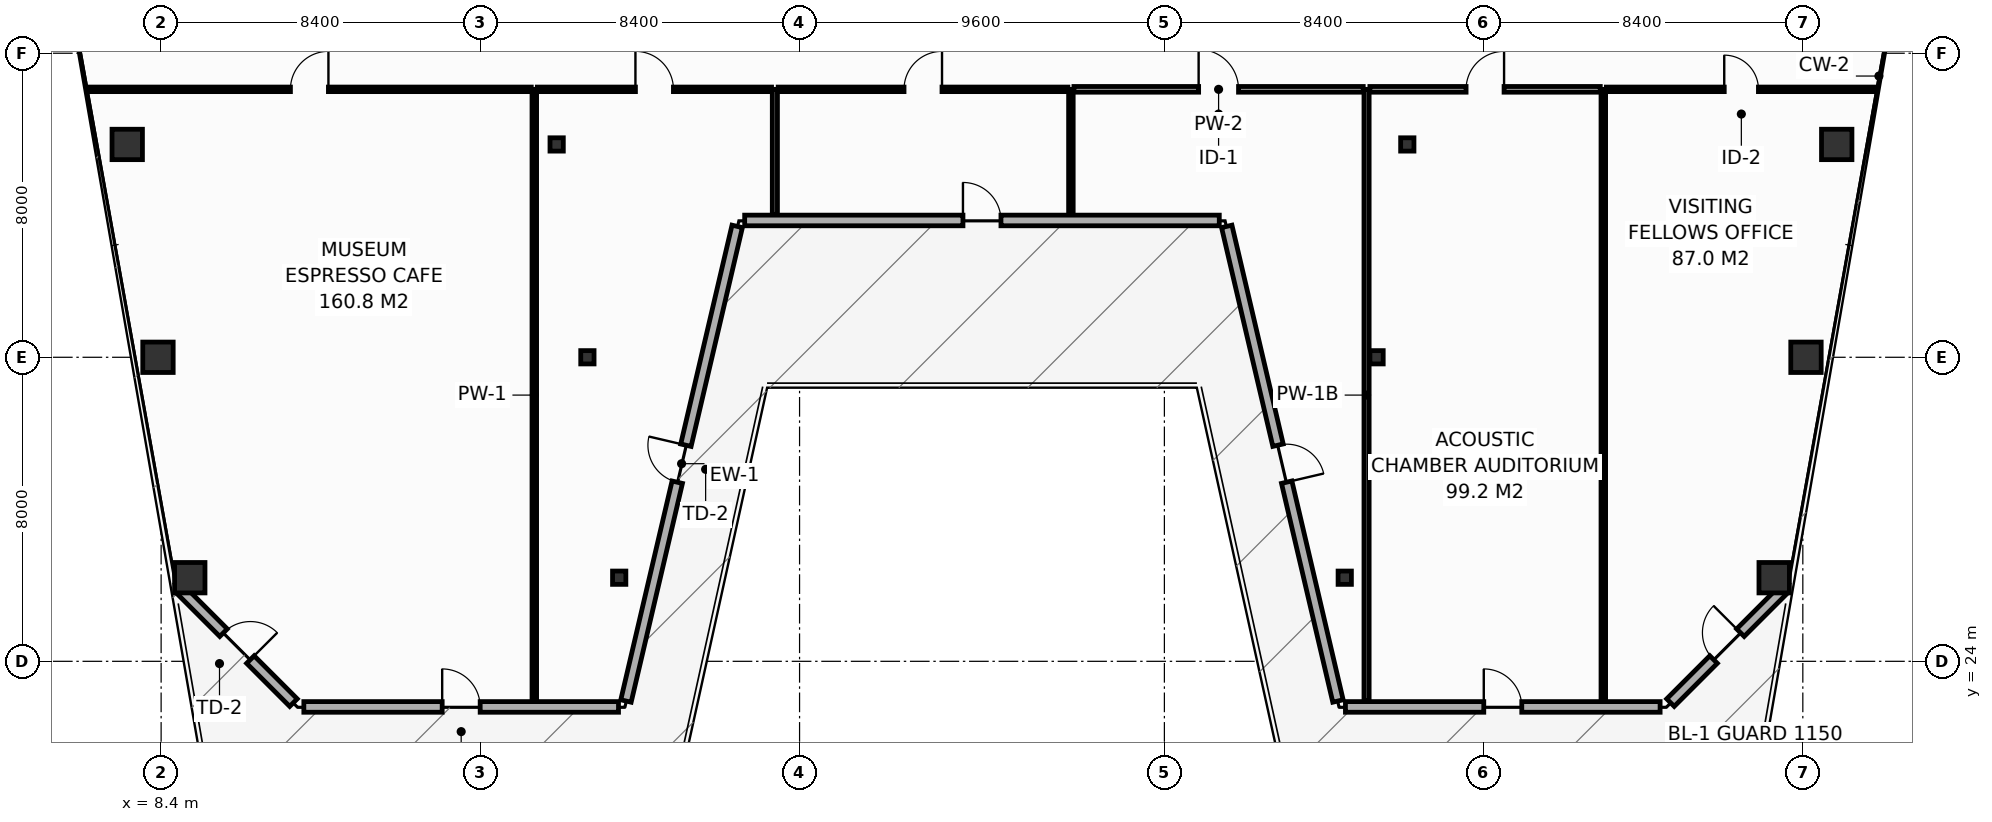
"""IFC4 building model, lengths in metres.
Left out: names, types, materials, properties, quantities, classifications, styles, units other than length and angle.
Written with IfcOpenShell. Run it as: python <this file> out.ifc"""

import sys

from ifc_helpers import new_model, si_unit, direction, frame, frame_2d, origin, origin_2d, place, context, subcontext, project, spatial, rectangle, hollow_rectangle, extrude, element, fill, save


model = new_model("IFC4")
c1 = context("Model", 3, precision=1e-05, world=origin(), true_north=direction((0.0, 1.0)))
c2 = subcontext(c1, "Body", "Model", "MODEL_VIEW")
j1 = project(units=[si_unit("LENGTHUNIT", "METRE"), si_unit("PLANEANGLEUNIT", "RADIAN")], contexts=[c1])
p1 = place(None, origin())
s1 = spatial("IfcSite", under=j1, at=p1, CompositionType="ELEMENT")
p2 = place(p1, origin())
s2 = spatial("IfcBuilding", under=s1, at=p2, CompositionType="ELEMENT")
p3 = place(p2, frame((0.0, 0.0, 253.4)))
s3 = spatial("IfcBuildingStorey", under=s2, at=p3, CompositionType="ELEMENT", Elevation=253.4)
for number, where, z_axis, x_axis in (
    (1, (9.154, 26.2, 0.0), (0.0, 0.0, 1.0), (1.0, 0.0, 0.0)),
    (2, (50.846, 26.2, 0.0), (0.0, 0.0, 1.0), (1.0, 0.0, 0.0)),
):
    element("IfcColumn", number, at=place(p3, frame(where, z_axis=z_axis, x_axis=x_axis)), inside=s3, PredefinedType="COLUMN", context=c2, shape_type="SweptSolid", body=[
        extrude(hollow_rectangle(XDim=0.8, YDim=0.8, WallThickness=0.036, at=origin_2d()), origin(), (0.0, 0.0, 1.0), 3.8),
    ])
for number, where, z_axis, x_axis in (
    (3, (20.454, 26.2, 0.0), (0.0, 0.0, 1.0), (1.0, 0.0, 0.0)),
    (4, (39.546, 26.2, 0.0), (0.0, 0.0, 1.0), (1.0, 0.0, 0.0)),
):
    element("IfcColumn", number, at=place(p3, frame(where, z_axis=z_axis, x_axis=x_axis)), inside=s3, PredefinedType="COLUMN", context=c2, shape_type="SweptSolid", body=[
        extrude(hollow_rectangle(XDim=0.35, YDim=0.35, WallThickness=0.016, at=origin_2d()), origin(), (0.0, 0.0, 1.0), 3.8),
    ])
for number, where, z_axis, x_axis in (
    (5, (8.317, 32.0, 0.0), (0.0, 0.0, 1.0), (1.0, 0.0, 0.0)),
    (6, (51.683, 32.0, 0.0), (0.0, 0.0, 1.0), (1.0, 0.0, 0.0)),
):
    element("IfcColumn", number, at=place(p3, frame(where, z_axis=z_axis, x_axis=x_axis)), inside=s3, PredefinedType="COLUMN", context=c2, shape_type="SweptSolid", body=[
        extrude(hollow_rectangle(XDim=0.8, YDim=0.8, WallThickness=0.036, at=origin_2d()), origin(), (0.0, 0.0, 1.0), 3.8),
    ])
for number, where, z_axis, x_axis in (
    (7, (19.617, 32.0, 0.0), (0.0, 0.0, 1.0), (1.0, 0.0, 0.0)),
    (8, (40.383, 32.0, 0.0), (0.0, 0.0, 1.0), (1.0, 0.0, 0.0)),
):
    element("IfcColumn", number, at=place(p3, frame(where, z_axis=z_axis, x_axis=x_axis)), inside=s3, PredefinedType="COLUMN", context=c2, shape_type="SweptSolid", body=[
        extrude(hollow_rectangle(XDim=0.35, YDim=0.35, WallThickness=0.016, at=origin_2d()), origin(), (0.0, 0.0, 1.0), 3.8),
    ])
for number, where, z_axis, x_axis in (
    (9, (7.508, 37.6, 0.0), (0.0, 0.0, 1.0), (1.0, 0.0, 0.0)),
    (10, (52.492, 37.6, 0.0), (0.0, 0.0, 1.0), (1.0, 0.0, 0.0)),
):
    element("IfcColumn", number, at=place(p3, frame(where, z_axis=z_axis, x_axis=x_axis)), inside=s3, PredefinedType="COLUMN", context=c2, shape_type="SweptSolid", body=[
        extrude(hollow_rectangle(XDim=0.8, YDim=0.8, WallThickness=0.036, at=origin_2d()), origin(), (0.0, 0.0, 1.0), 3.8),
    ])
for number, where, z_axis, x_axis in (
    (11, (18.808, 37.6, 0.0), (0.0, 0.0, 1.0), (1.0, 0.0, 0.0)),
    (12, (41.192, 37.6, 0.0), (0.0, 0.0, 1.0), (1.0, 0.0, 0.0)),
):
    element("IfcColumn", number, at=place(p3, frame(where, z_axis=z_axis, x_axis=x_axis)), inside=s3, PredefinedType="COLUMN", context=c2, shape_type="SweptSolid", body=[
        extrude(hollow_rectangle(XDim=0.35, YDim=0.35, WallThickness=0.016, at=origin_2d()), origin(), (0.0, 0.0, 1.0), 3.8),
    ])
p4 = place(p3, frame((8.909, 25.887, 0.0), z_axis=(0.0, 0.0, 1.0), x_axis=(0.707106781187, -0.707106781187, 0.0)))
e13 = element("IfcWall", 13, at=p4, inside=s3, PredefinedType="STANDARD", context=c2, shape_type="SweptSolid", body=[
    extrude(rectangle(XDim=4.206, YDim=0.28, at=frame_2d((2.103, 0.0))), origin(), (0.0, 0.0, 1.0), 3.55),
])
p5 = place(p4, frame((1.603, 0.0, 0.0)))
e14 = element("IfcOpeningElement", 14, at=p5, cuts=e13, PredefinedType="OPENING", context=c2, shape_type="SweptSolid", body=[
    extrude(rectangle(XDim=1.0, YDim=2.2, at=frame_2d((0.5, 1.1))), frame((0.0, 0.15, 0.0), z_axis=(0.0, -1.0, 0.0), x_axis=(1.0, 0.0, 0.0)), (0.0, 0.0, 1.0), 0.3),
])
p6 = place(p3, frame((12.156, 22.8, 0.0), z_axis=(0.0, 0.0, 1.0), x_axis=(1.0, 0.0, 0.0)))
e15 = element("IfcWall", 15, at=p6, inside=s3, PredefinedType="STANDARD", context=c2, shape_type="SweptSolid", body=[
    extrude(rectangle(XDim=8.28, YDim=0.28, at=frame_2d((4.14, 0.0))), origin(), (0.0, 0.0, 1.0), 3.55),
])
p7 = place(p6, frame((3.64, 0.0, 0.0)))
e16 = element("IfcOpeningElement", 16, at=p7, cuts=e15, PredefinedType="OPENING", context=c2, shape_type="SweptSolid", body=[
    extrude(rectangle(XDim=1.0, YDim=2.2, at=frame_2d((0.5, 1.1))), frame((0.0, 0.15, 0.0), z_axis=(0.0, -1.0, 0.0), x_axis=(1.0, 0.0, 0.0)), (0.0, 0.0, 1.0), 0.3),
])
p8 = place(p3, frame((20.632, 22.956, 0.0), z_axis=(0.0, 0.0, 1.0), x_axis=(0.22819583345, 0.973615253371, 0.0)))
e17 = element("IfcWall", 17, at=p8, inside=s3, PredefinedType="STANDARD", context=c2, shape_type="SweptSolid", body=[
    extrude(rectangle(XDim=12.827, YDim=0.28, at=frame_2d((6.413, 0.0))), origin(), (0.0, 0.0, 1.0), 3.55),
])
p9 = place(p8, frame((5.913, 0.0, 0.0)))
e18 = element("IfcOpeningElement", 18, at=p9, cuts=e17, PredefinedType="OPENING", context=c2, shape_type="SweptSolid", body=[
    extrude(rectangle(XDim=1.0, YDim=2.2, at=frame_2d((0.5, 1.1))), frame((0.0, 0.15, 0.0), z_axis=(0.0, -1.0, 0.0), x_axis=(1.0, 0.0, 0.0)), (0.0, 0.0, 1.0), 0.3),
])
p10 = place(p3, frame((23.756, 35.6, 0.0), z_axis=(0.0, 0.0, 1.0), x_axis=(1.0, 0.0, 0.0)))
e19 = element("IfcWall", 19, at=p10, inside=s3, PredefinedType="STANDARD", context=c2, shape_type="SweptSolid", body=[
    extrude(rectangle(XDim=12.489, YDim=0.28, at=frame_2d((6.244, 0.0))), origin(), (0.0, 0.0, 1.0), 3.55),
])
p11 = place(p10, frame((5.744, 0.0, 0.0)))
e20 = element("IfcOpeningElement", 20, at=p11, cuts=e19, PredefinedType="OPENING", context=c2, shape_type="SweptSolid", body=[
    extrude(rectangle(XDim=1.0, YDim=2.2, at=frame_2d((0.5, 1.1))), frame((0.0, 0.15, 0.0), z_axis=(0.0, -1.0, 0.0), x_axis=(1.0, 0.0, 0.0)), (0.0, 0.0, 1.0), 0.3),
])
p12 = place(p3, frame((36.441, 35.444, 0.0), z_axis=(0.0, 0.0, 1.0), x_axis=(0.22819583345, -0.973615253371, 0.0)))
e21 = element("IfcWall", 21, at=p12, inside=s3, PredefinedType="STANDARD", context=c2, shape_type="SweptSolid", body=[
    extrude(rectangle(XDim=12.827, YDim=0.28, at=frame_2d((6.413, 0.0))), origin(), (0.0, 0.0, 1.0), 3.55),
])
p13 = place(p12, frame((5.913, 0.0, 0.0)))
e22 = element("IfcOpeningElement", 22, at=p13, cuts=e21, PredefinedType="OPENING", context=c2, shape_type="SweptSolid", body=[
    extrude(rectangle(XDim=1.0, YDim=2.2, at=frame_2d((0.5, 1.1))), frame((0.0, 0.15, 0.0), z_axis=(0.0, -1.0, 0.0), x_axis=(1.0, 0.0, 0.0)), (0.0, 0.0, 1.0), 0.3),
])
p14 = place(p3, frame((39.564, 22.8, 0.0), z_axis=(0.0, 0.0, 1.0), x_axis=(1.0, 0.0, 0.0)))
e23 = element("IfcWall", 23, at=p14, inside=s3, PredefinedType="STANDARD", context=c2, shape_type="SweptSolid", body=[
    extrude(rectangle(XDim=8.28, YDim=0.28, at=frame_2d((4.14, 0.0))), origin(), (0.0, 0.0, 1.0), 3.55),
])
p15 = place(p14, frame((3.64, 0.0, 0.0)))
e24 = element("IfcOpeningElement", 24, at=p15, cuts=e23, PredefinedType="OPENING", context=c2, shape_type="SweptSolid", body=[
    extrude(rectangle(XDim=1.0, YDim=2.2, at=frame_2d((0.5, 1.1))), frame((0.0, 0.15, 0.0), z_axis=(0.0, -1.0, 0.0), x_axis=(1.0, 0.0, 0.0)), (0.0, 0.0, 1.0), 0.3),
])
p16 = place(p3, frame((48.117, 22.913, 0.0), z_axis=(0.0, 0.0, 1.0), x_axis=(0.707106781187, 0.707106781187, 0.0)))
e25 = element("IfcWall", 25, at=p16, inside=s3, PredefinedType="STANDARD", context=c2, shape_type="SweptSolid", body=[
    extrude(rectangle(XDim=4.206, YDim=0.28, at=frame_2d((2.103, 0.0))), origin(), (0.0, 0.0, 1.0), 3.55),
])
p17 = place(p16, frame((1.603, 0.0, 0.0)))
e26 = element("IfcOpeningElement", 26, at=p17, cuts=e25, PredefinedType="OPENING", context=c2, shape_type="SweptSolid", body=[
    extrude(rectangle(XDim=1.0, YDim=2.2, at=frame_2d((0.5, 1.1))), frame((0.0, 0.15, 0.0), z_axis=(0.0, -1.0, 0.0), x_axis=(1.0, 0.0, 0.0)), (0.0, 0.0, 1.0), 0.3),
])
p18 = place(p3, frame((18.22, 22.96, 0.0), z_axis=(0.0, 0.0, 1.0), x_axis=(0.0, 1.0, 0.0)))
e27 = element("IfcWall", 27, at=p18, inside=s3, PredefinedType="PARTITIONING", context=c2, shape_type="SweptSolid", body=[
    extrude(rectangle(XDim=16.09, YDim=0.12, at=frame_2d((8.045, 0.0))), origin(), (0.0, 0.0, 1.0), 2.947),
])
p19 = place(p3, frame((24.55, 35.76, 0.0), z_axis=(0.0, 0.0, 1.0), x_axis=(0.0, 1.0, 0.0)))
e28 = element("IfcWall", 28, at=p19, inside=s3, PredefinedType="PARTITIONING", context=c2, shape_type="SweptSolid", body=[
    extrude(rectangle(XDim=3.29, YDim=0.135, at=frame_2d((1.645, 0.0))), origin(), (0.0, 0.0, 1.0), 3.55),
])
p20 = place(p3, frame((32.34, 35.76, 0.0), z_axis=(0.0, 0.0, 1.0), x_axis=(0.0, 1.0, 0.0)))
e29 = element("IfcWall", 29, at=p20, inside=s3, PredefinedType="PARTITIONING", context=c2, shape_type="SweptSolid", body=[
    extrude(rectangle(XDim=3.29, YDim=0.12, at=frame_2d((1.645, 0.0))), origin(), (0.0, 0.0, 1.0), 3.55),
])
p21 = place(p3, frame((40.12, 22.96, 0.0), z_axis=(0.0, 0.0, 1.0), x_axis=(0.0, 1.0, 0.0)))
e30 = element("IfcWall", 30, at=p21, inside=s3, PredefinedType="PARTITIONING", context=c2, shape_type="SweptSolid", body=[
    extrude(rectangle(XDim=16.09, YDim=0.135, at=frame_2d((8.045, 0.0))), origin(), (0.0, 0.0, 1.0), 2.947),
])
p22 = place(p3, frame((46.35, 22.96, 0.0), z_axis=(0.0, 0.0, 1.0), x_axis=(0.0, 1.0, 0.0)))
e31 = element("IfcWall", 31, at=p22, inside=s3, PredefinedType="PARTITIONING", context=c2, shape_type="SweptSolid", body=[
    extrude(rectangle(XDim=16.09, YDim=0.12, at=frame_2d((8.045, 0.0))), origin(), (0.0, 0.0, 1.0), 2.947),
])
p23 = place(p3, frame((6.466, 39.05, 0.0), z_axis=(0.0, 0.0, 1.0), x_axis=(1.0, 0.0, 0.0)))
e32 = element("IfcWall", 32, at=p23, inside=s3, PredefinedType="PARTITIONING", context=c2, shape_type="SweptSolid", body=[
    extrude(rectangle(XDim=11.674, YDim=0.12, at=frame_2d((5.837, 0.0))), origin(), (0.0, 0.0, 1.0), 3.085),
])
p24 = place(p23, frame((5.337, 0.0, 0.0)))
e33 = element("IfcOpeningElement", 33, at=p24, cuts=e32, PredefinedType="OPENING", context=c2, shape_type="SweptSolid", body=[
    extrude(rectangle(XDim=1.0, YDim=2.15, at=frame_2d((0.5, 1.075))), frame((0.0, 0.07, 0.0), z_axis=(0.0, -1.0, 0.0), x_axis=(1.0, 0.0, 0.0)), (0.0, 0.0, 1.0), 0.14),
])
p25 = place(p3, frame((18.3, 39.05, 0.0), z_axis=(0.0, 0.0, 1.0), x_axis=(1.0, 0.0, 0.0)))
e34 = element("IfcWall", 34, at=p25, inside=s3, PredefinedType="PARTITIONING", context=c2, shape_type="SweptSolid", body=[
    extrude(rectangle(XDim=6.162, YDim=0.12, at=frame_2d((3.081, 0.0))), origin(), (0.0, 0.0, 1.0), 2.947),
])
p26 = place(p25, frame((2.581, 0.0, 0.0)))
e35 = element("IfcOpeningElement", 35, at=p26, cuts=e34, PredefinedType="OPENING", context=c2, shape_type="SweptSolid", body=[
    extrude(rectangle(XDim=1.0, YDim=2.15, at=frame_2d((0.5, 1.075))), frame((0.0, 0.07, 0.0), z_axis=(0.0, -1.0, 0.0), x_axis=(1.0, 0.0, 0.0)), (0.0, 0.0, 1.0), 0.14),
])
p27 = place(p3, frame((24.637, 39.05, 0.0), z_axis=(0.0, 0.0, 1.0), x_axis=(1.0, 0.0, 0.0)))
e36 = element("IfcWall", 36, at=p27, inside=s3, PredefinedType="PARTITIONING", context=c2, shape_type="SweptSolid", body=[
    extrude(rectangle(XDim=7.623, YDim=0.12, at=frame_2d((3.811, 0.0))), origin(), (0.0, 0.0, 1.0), 3.55),
])
p28 = place(p27, frame((3.311, 0.0, 0.0)))
e37 = element("IfcOpeningElement", 37, at=p28, cuts=e36, PredefinedType="OPENING", context=c2, shape_type="SweptSolid", body=[
    extrude(rectangle(XDim=1.0, YDim=2.15, at=frame_2d((0.5, 1.075))), frame((0.0, 0.07, 0.0), z_axis=(0.0, -1.0, 0.0), x_axis=(1.0, 0.0, 0.0)), (0.0, 0.0, 1.0), 0.14),
])
p29 = place(p3, frame((32.42, 39.05, 0.0), z_axis=(0.0, 0.0, 1.0), x_axis=(1.0, 0.0, 0.0)))
e38 = element("IfcWall", 38, at=p29, inside=s3, PredefinedType="PARTITIONING", context=c2, shape_type="SweptSolid", body=[
    extrude(rectangle(XDim=7.613, YDim=0.15, at=frame_2d((3.806, 0.0))), origin(), (0.0, 0.0, 1.0), 2.947),
])
p30 = place(p29, frame((3.281, 0.0, 0.0)))
e39 = element("IfcOpeningElement", 39, at=p30, cuts=e38, PredefinedType="OPENING", context=c2, shape_type="SweptSolid", body=[
    extrude(rectangle(XDim=1.05, YDim=2.15, at=frame_2d((0.525, 1.075))), frame((0.0, 0.085, 0.0), z_axis=(0.0, -1.0, 0.0), x_axis=(1.0, 0.0, 0.0)), (0.0, 0.0, 1.0), 0.17),
])
p31 = place(p3, frame((40.208, 39.05, 0.0), z_axis=(0.0, 0.0, 1.0), x_axis=(1.0, 0.0, 0.0)))
e40 = element("IfcWall", 40, at=p31, inside=s3, PredefinedType="PARTITIONING", context=c2, shape_type="SweptSolid", body=[
    extrude(rectangle(XDim=6.062, YDim=0.15, at=frame_2d((3.031, 0.0))), origin(), (0.0, 0.0, 1.0), 3.55),
])
p32 = place(p31, frame((2.531, 0.0, 0.0)))
e41 = element("IfcOpeningElement", 41, at=p32, cuts=e40, PredefinedType="OPENING", context=c2, shape_type="SweptSolid", body=[
    extrude(rectangle(XDim=1.0, YDim=2.15, at=frame_2d((0.5, 1.075))), frame((0.0, 0.085, 0.0), z_axis=(0.0, -1.0, 0.0), x_axis=(1.0, 0.0, 0.0)), (0.0, 0.0, 1.0), 0.17),
])
p33 = place(p3, frame((46.43, 39.05, 0.0), z_axis=(0.0, 0.0, 1.0), x_axis=(1.0, 0.0, 0.0)))
e42 = element("IfcWall", 42, at=p33, inside=s3, PredefinedType="PARTITIONING", context=c2, shape_type="SweptSolid", body=[
    extrude(rectangle(XDim=7.104, YDim=0.12, at=frame_2d((3.552, 0.0))), origin(), (0.0, 0.0, 1.0), 3.085),
])
p34 = place(p33, frame((3.102, 0.0, 0.0)))
e43 = element("IfcOpeningElement", 43, at=p34, cuts=e42, PredefinedType="OPENING", context=c2, shape_type="SweptSolid", body=[
    extrude(rectangle(XDim=0.9, YDim=2.1, at=frame_2d((0.45, 1.05))), frame((0.0, 0.07, 0.0), z_axis=(0.0, -1.0, 0.0), x_axis=(1.0, 0.0, 0.0)), (0.0, 0.0, 1.0), 0.14),
])
p35 = place(p5, origin())
e44 = element("IfcDoor", 44, at=p35, inside=s3, OperationType="SINGLE_SWING_RIGHT", PredefinedType="DOOR", context=c2, shape_type="SweptSolid", body=[
    extrude(rectangle(XDim=1.0, YDim=2.2, at=frame_2d((0.5, 1.1))), frame((0.0, 0.025, 0.0), z_axis=(0.0, -1.0, 0.0), x_axis=(1.0, 0.0, 0.0)), (0.0, 0.0, 1.0), 0.05),
])
fill(e14, e44)
p36 = place(p7, origin())
e45 = element("IfcDoor", 45, at=p36, inside=s3, OperationType="SINGLE_SWING_LEFT", PredefinedType="DOOR", context=c2, shape_type="SweptSolid", body=[
    extrude(rectangle(XDim=1.0, YDim=2.2, at=frame_2d((0.5, 1.1))), frame((0.0, 0.025, 0.0), z_axis=(0.0, -1.0, 0.0), x_axis=(1.0, 0.0, 0.0)), (0.0, 0.0, 1.0), 0.05),
])
fill(e16, e45)
p37 = place(p9, origin())
e46 = element("IfcDoor", 46, at=p37, inside=s3, OperationType="SINGLE_SWING_RIGHT", PredefinedType="DOOR", context=c2, shape_type="SweptSolid", body=[
    extrude(rectangle(XDim=1.0, YDim=2.2, at=frame_2d((0.5, 1.1))), frame((0.0, 0.025, 0.0), z_axis=(0.0, -1.0, 0.0), x_axis=(1.0, 0.0, 0.0)), (0.0, 0.0, 1.0), 0.05),
])
fill(e18, e46)
p38 = place(p11, origin())
e47 = element("IfcDoor", 47, at=p38, inside=s3, OperationType="SINGLE_SWING_LEFT", PredefinedType="DOOR", context=c2, shape_type="SweptSolid", body=[
    extrude(rectangle(XDim=1.0, YDim=2.2, at=frame_2d((0.5, 1.1))), frame((0.0, 0.025, 0.0), z_axis=(0.0, -1.0, 0.0), x_axis=(1.0, 0.0, 0.0)), (0.0, 0.0, 1.0), 0.05),
])
fill(e20, e47)
p39 = place(p13, origin())
e48 = element("IfcDoor", 48, at=p39, inside=s3, OperationType="SINGLE_SWING_RIGHT", PredefinedType="DOOR", context=c2, shape_type="SweptSolid", body=[
    extrude(rectangle(XDim=1.0, YDim=2.2, at=frame_2d((0.5, 1.1))), frame((0.0, 0.025, 0.0), z_axis=(0.0, -1.0, 0.0), x_axis=(1.0, 0.0, 0.0)), (0.0, 0.0, 1.0), 0.05),
])
fill(e22, e48)
p40 = place(p15, origin())
e49 = element("IfcDoor", 49, at=p40, inside=s3, OperationType="SINGLE_SWING_LEFT", PredefinedType="DOOR", context=c2, shape_type="SweptSolid", body=[
    extrude(rectangle(XDim=1.0, YDim=2.2, at=frame_2d((0.5, 1.1))), frame((0.0, 0.025, 0.0), z_axis=(0.0, -1.0, 0.0), x_axis=(1.0, 0.0, 0.0)), (0.0, 0.0, 1.0), 0.05),
])
fill(e24, e49)
p41 = place(p17, origin())
e50 = element("IfcDoor", 50, at=p41, inside=s3, OperationType="SINGLE_SWING_RIGHT", PredefinedType="DOOR", context=c2, shape_type="SweptSolid", body=[
    extrude(rectangle(XDim=1.0, YDim=2.2, at=frame_2d((0.5, 1.1))), frame((0.0, 0.025, 0.0), z_axis=(0.0, -1.0, 0.0), x_axis=(1.0, 0.0, 0.0)), (0.0, 0.0, 1.0), 0.05),
])
fill(e26, e50)
p42 = place(p24, origin())
e51 = element("IfcDoor", 51, at=p42, inside=s3, OperationType="SINGLE_SWING_RIGHT", PredefinedType="DOOR", context=c2, shape_type="SweptSolid", body=[
    extrude(rectangle(XDim=1.0, YDim=2.15, at=frame_2d((0.5, 1.075))), frame((0.0, 0.025, 0.0), z_axis=(0.0, -1.0, 0.0), x_axis=(1.0, 0.0, 0.0)), (0.0, 0.0, 1.0), 0.05),
])
fill(e33, e51)
p43 = place(p26, origin())
e52 = element("IfcDoor", 52, at=p43, inside=s3, OperationType="SINGLE_SWING_LEFT", PredefinedType="DOOR", context=c2, shape_type="SweptSolid", body=[
    extrude(rectangle(XDim=1.0, YDim=2.15, at=frame_2d((0.5, 1.075))), frame((0.0, 0.025, 0.0), z_axis=(0.0, -1.0, 0.0), x_axis=(1.0, 0.0, 0.0)), (0.0, 0.0, 1.0), 0.05),
])
fill(e35, e52)
p44 = place(p28, origin())
e53 = element("IfcDoor", 53, at=p44, inside=s3, OperationType="SINGLE_SWING_RIGHT", PredefinedType="DOOR", context=c2, shape_type="SweptSolid", body=[
    extrude(rectangle(XDim=1.0, YDim=2.15, at=frame_2d((0.5, 1.075))), frame((0.0, 0.025, 0.0), z_axis=(0.0, -1.0, 0.0), x_axis=(1.0, 0.0, 0.0)), (0.0, 0.0, 1.0), 0.05),
])
fill(e37, e53)
p45 = place(p30, origin())
e54 = element("IfcDoor", 54, at=p45, inside=s3, OperationType="SINGLE_SWING_LEFT", PredefinedType="DOOR", context=c2, shape_type="SweptSolid", body=[
    extrude(rectangle(XDim=1.05, YDim=2.15, at=frame_2d((0.525, 1.075))), frame((0.0, 0.025, 0.0), z_axis=(0.0, -1.0, 0.0), x_axis=(1.0, 0.0, 0.0)), (0.0, 0.0, 1.0), 0.05),
])
fill(e39, e54)
p46 = place(p32, origin())
e55 = element("IfcDoor", 55, at=p46, inside=s3, OperationType="SINGLE_SWING_RIGHT", PredefinedType="DOOR", context=c2, shape_type="SweptSolid", body=[
    extrude(rectangle(XDim=1.0, YDim=2.15, at=frame_2d((0.5, 1.075))), frame((0.0, 0.025, 0.0), z_axis=(0.0, -1.0, 0.0), x_axis=(1.0, 0.0, 0.0)), (0.0, 0.0, 1.0), 0.05),
])
fill(e41, e55)
p47 = place(p34, origin())
e56 = element("IfcDoor", 56, at=p47, inside=s3, OperationType="SINGLE_SWING_LEFT", PredefinedType="DOOR", context=c2, shape_type="SweptSolid", body=[
    extrude(rectangle(XDim=0.9, YDim=2.1, at=frame_2d((0.45, 1.05))), frame((0.0, 0.025, 0.0), z_axis=(0.0, -1.0, 0.0), x_axis=(1.0, 0.0, 0.0)), (0.0, 0.0, 1.0), 0.05),
])
fill(e43, e56)
save(model, sys.argv[1])
